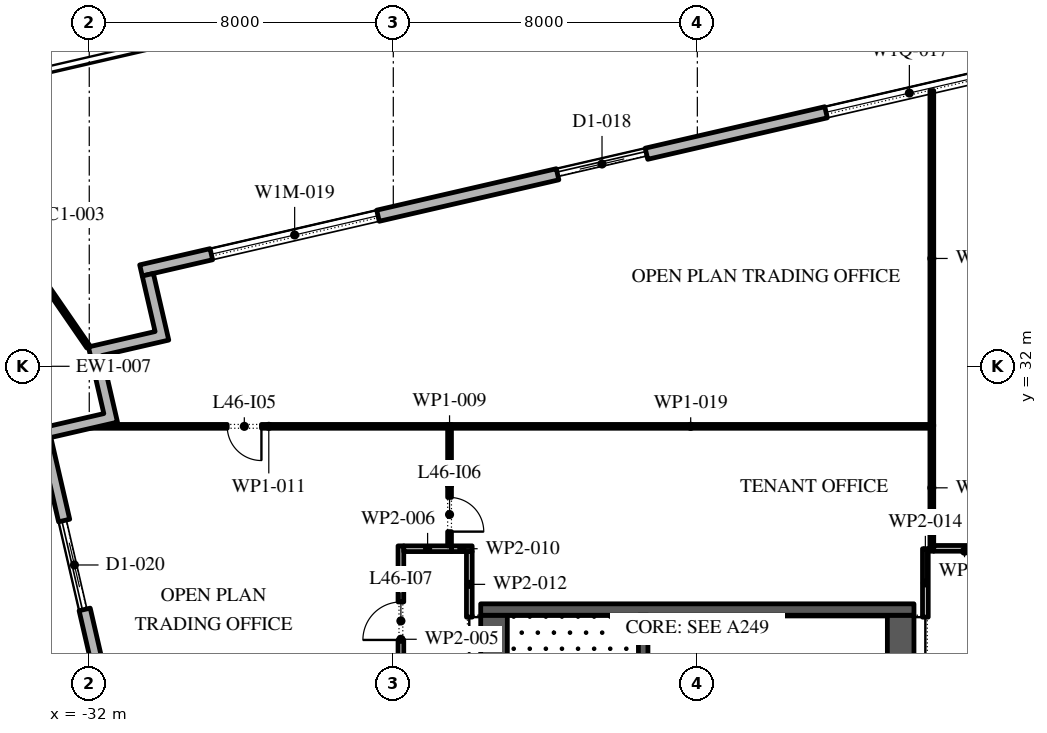
"""IFC4 building model, lengths in metres.
Left out: names, types, materials, properties, quantities, classifications, styles, units other than length and angle.
Written with IfcOpenShell. Run it as: python <this file> out.ifc"""

import sys

from ifc_helpers import new_model, si_unit, direction, frame, frame_2d, origin, place, context, subcontext, project, spatial, polyline, rectangle, outline, extrude, element, fill, save


model = new_model("IFC4")
c1 = context("Model", 3, precision=1e-05, world=origin(), true_north=direction((0.0, 1.0)))
c2 = subcontext(c1, "Body", "Model", "MODEL_VIEW")
j1 = project(units=[si_unit("LENGTHUNIT", "METRE"), si_unit("PLANEANGLEUNIT", "RADIAN")], contexts=[c1])
p1 = place(None, origin())
s1 = spatial("IfcSite", under=j1, at=p1, CompositionType="ELEMENT")
p2 = place(p1, origin())
s2 = spatial("IfcBuilding", under=s1, at=p2, CompositionType="ELEMENT")
p3 = place(p2, frame((0.0, 0.0, 209.4)))
s3 = spatial("IfcBuildingStorey", under=s2, at=p3, CompositionType="ELEMENT", Elevation=209.4)
p4 = place(p3, frame((17.592, 45.657, 0.0), z_axis=(0.0, 0.0, 1.0), x_axis=(-0.974370243697, -0.224950279389, 0.0)))
e1 = element("IfcWall", 1, at=p4, inside=s3, PredefinedType="STANDARD", context=c2, shape_type="SweptSolid", body=[
    extrude(rectangle(XDim=49.5, YDim=0.3, at=frame_2d((24.75, 0.0))), origin(), (0.0, 0.0, 1.0), 4.0),
])
p5 = place(p4, frame((3.6, 0.0, 0.0)))
e2 = element("IfcOpeningElement", 2, at=p5, cuts=e1, PredefinedType="OPENING", context=c2, shape_type="SweptSolid", body=[
    extrude(rectangle(XDim=2.4, YDim=3.5, at=frame_2d((1.2, 1.75))), frame((0.0, 0.16, 0.0), z_axis=(0.0, -1.0, 0.0), x_axis=(1.0, 0.0, 0.0)), (0.0, 0.0, 1.0), 0.32),
])
p6 = place(p4, frame((9.9, 0.0, 0.45)))
e3 = element("IfcOpeningElement", 3, at=p6, cuts=e1, PredefinedType="OPENING", context=c2, shape_type="SweptSolid", body=[
    extrude(rectangle(XDim=4.5, YDim=2.45, at=frame_2d((2.25, 1.225))), frame((0.0, 0.16, 0.0), z_axis=(0.0, -1.0, 0.0), x_axis=(1.0, 0.0, 0.0)), (0.0, 0.0, 1.0), 0.32),
])
p7 = place(p4, frame((18.2, 0.0, 0.45)))
e4 = element("IfcOpeningElement", 4, at=p7, cuts=e1, PredefinedType="OPENING", context=c2, shape_type="SweptSolid", body=[
    extrude(rectangle(XDim=4.5, YDim=2.45, at=frame_2d((2.25, 1.225))), frame((0.0, 0.16, 0.0), z_axis=(0.0, -1.0, 0.0), x_axis=(1.0, 0.0, 0.0)), (0.0, 0.0, 1.0), 0.32),
])
p8 = place(p4, frame((26.5, 0.0, 0.45)))
e5 = element("IfcOpeningElement", 5, at=p8, cuts=e1, PredefinedType="OPENING", context=c2, shape_type="SweptSolid", body=[
    extrude(rectangle(XDim=4.5, YDim=2.45, at=frame_2d((2.25, 1.225))), frame((0.0, 0.16, 0.0), z_axis=(0.0, -1.0, 0.0), x_axis=(1.0, 0.0, 0.0)), (0.0, 0.0, 1.0), 0.32),
])
p9 = place(p4, frame((35.85, 0.0, 0.0)))
e6 = element("IfcOpeningElement", 6, at=p9, cuts=e1, PredefinedType="OPENING", context=c2, shape_type="SweptSolid", body=[
    extrude(rectangle(XDim=2.4, YDim=3.5, at=frame_2d((1.2, 1.75))), frame((0.0, 0.16, 0.0), z_axis=(0.0, -1.0, 0.0), x_axis=(1.0, 0.0, 0.0)), (0.0, 0.0, 1.0), 0.32),
])
p10 = place(p4, frame((43.1, 0.0, 0.45)))
e7 = element("IfcOpeningElement", 7, at=p10, cuts=e1, PredefinedType="OPENING", context=c2, shape_type="SweptSolid", body=[
    extrude(rectangle(XDim=4.5, YDim=2.575, at=frame_2d((2.25, 1.288))), frame((0.0, 0.16, 0.0), z_axis=(0.0, -1.0, 0.0), x_axis=(1.0, 0.0, 0.0)), (0.0, 0.0, 1.0), 0.32),
])
p11 = place(p3, frame((-33.157, 30.092, 0.0), z_axis=(0.0, 0.0, 1.0), x_axis=(0.224950279389, -0.974370243697, 0.0)))
e8 = element("IfcWall", 8, at=p11, inside=s3, PredefinedType="STANDARD", context=c2, shape_type="SweptSolid", body=[
    extrude(rectangle(XDim=49.5, YDim=0.3, at=frame_2d((24.75, 0.0))), origin(), (0.0, 0.0, 1.0), 4.0),
])
p12 = place(p11, frame((2.207, 0.0, 0.0)))
e9 = element("IfcOpeningElement", 9, at=p12, cuts=e8, PredefinedType="OPENING", context=c2, shape_type="SweptSolid", body=[
    extrude(rectangle(XDim=2.4, YDim=3.5, at=frame_2d((1.2, 1.75))), frame((0.0, 0.16, 0.0), z_axis=(0.0, -1.0, 0.0), x_axis=(1.0, 0.0, 0.0)), (0.0, 0.0, 1.0), 0.32),
])
p13 = place(p11, frame((8.121, 0.0, 0.45)))
e10 = element("IfcOpeningElement", 10, at=p13, cuts=e8, PredefinedType="OPENING", context=c2, shape_type="SweptSolid", body=[
    extrude(rectangle(XDim=4.5, YDim=2.825, at=frame_2d((2.25, 1.413))), frame((0.0, 0.16, 0.0), z_axis=(0.0, -1.0, 0.0), x_axis=(1.0, 0.0, 0.0)), (0.0, 0.0, 1.0), 0.32),
])
p14 = place(p11, frame((15.236, 0.0, 0.45)))
e11 = element("IfcOpeningElement", 11, at=p14, cuts=e8, PredefinedType="OPENING", context=c2, shape_type="SweptSolid", body=[
    extrude(rectangle(XDim=4.5, YDim=2.95, at=frame_2d((2.25, 1.475))), frame((0.0, 0.16, 0.0), z_axis=(0.0, -1.0, 0.0), x_axis=(1.0, 0.0, 0.0)), (0.0, 0.0, 1.0), 0.32),
])
p15 = place(p11, frame((22.35, 0.0, 0.45)))
e12 = element("IfcOpeningElement", 12, at=p15, cuts=e8, PredefinedType="OPENING", context=c2, shape_type="SweptSolid", body=[
    extrude(rectangle(XDim=4.5, YDim=3.0, at=frame_2d((2.25, 1.5))), frame((0.0, 0.16, 0.0), z_axis=(0.0, -1.0, 0.0), x_axis=(1.0, 0.0, 0.0)), (0.0, 0.0, 1.0), 0.32),
])
p16 = place(p11, frame((30.514, 0.0, 0.0)))
e13 = element("IfcOpeningElement", 13, at=p16, cuts=e8, PredefinedType="OPENING", context=c2, shape_type="SweptSolid", body=[
    extrude(rectangle(XDim=2.4, YDim=3.5, at=frame_2d((1.2, 1.75))), frame((0.0, 0.16, 0.0), z_axis=(0.0, -1.0, 0.0), x_axis=(1.0, 0.0, 0.0)), (0.0, 0.0, 1.0), 0.32),
])
p17 = place(p11, frame((36.579, 0.0, 0.45)))
e14 = element("IfcOpeningElement", 14, at=p17, cuts=e8, PredefinedType="OPENING", context=c2, shape_type="SweptSolid", body=[
    extrude(rectangle(XDim=4.5, YDim=3.05, at=frame_2d((2.25, 1.525))), frame((0.0, 0.16, 0.0), z_axis=(0.0, -1.0, 0.0), x_axis=(1.0, 0.0, 0.0)), (0.0, 0.0, 1.0), 0.32),
])
p18 = place(p11, frame((43.693, 0.0, 0.45)))
e15 = element("IfcOpeningElement", 15, at=p18, cuts=e8, PredefinedType="OPENING", context=c2, shape_type="SweptSolid", body=[
    extrude(rectangle(XDim=4.5, YDim=3.05, at=frame_2d((2.25, 1.525))), frame((0.0, 0.16, 0.0), z_axis=(0.0, -1.0, 0.0), x_axis=(1.0, 0.0, 0.0)), (0.0, 0.0, 1.0), 0.32),
])
p19 = place(p3, origin())
e16 = element("IfcWall", 16, at=p19, inside=s3, PredefinedType="STANDARD", context=c2, shape_type="SweptSolid", body=[
    extrude(outline(polyline([(-31.617, 30.756), (-32.022, 32.51), (-30.268, 32.914), (-30.605, 34.376), (-30.313, 34.443), (-29.908, 32.69), (-31.662, 32.285), (-31.257, 30.531), (-33.303, 30.058), (-33.371, 30.351), (-31.617, 30.756)])), origin(), (0.0, 0.0, 1.0), 4.0),
])
p20 = place(p3, frame((-32.022, 32.51, -0.05), z_axis=(0.0, 0.0, 1.0), x_axis=(-0.566963777768, 0.823742723609, 0.0)))
e17 = element("IfcWall", 17, at=p20, inside=s3, PredefinedType="STANDARD", context=c2, shape_type="SweptSolid", body=[
    extrude(rectangle(XDim=5.668, YDim=0.1, at=frame_2d((2.834, 0.0))), origin(), (0.0, 0.0, 1.0), 4.05),
])
p21 = place(p3, frame((-21.35, -2.45, 0.0), z_axis=(0.0, 0.0, 1.0), x_axis=(0.0, 1.0, 0.0)))
e18 = element("IfcWall", 18, at=p21, inside=s3, PredefinedType="SHEAR", context=c2, shape_type="SweptSolid", body=[
    extrude(rectangle(XDim=27.9, YDim=0.7, at=frame_2d((13.95, 0.0))), origin(), (0.0, 0.0, 1.0), 4.0),
])
p22 = place(p21, frame((5.05, 0.0, 0.0)))
e19 = element("IfcOpeningElement", 19, at=p22, cuts=e18, PredefinedType="OPENING", context=c2, shape_type="SweptSolid", body=[
    extrude(rectangle(XDim=1.2, YDim=2.1, at=frame_2d((0.6, 1.05))), frame((0.0, 0.36, 0.0), z_axis=(0.0, -1.0, 0.0), x_axis=(1.0, 0.0, 0.0)), (0.0, 0.0, 1.0), 0.72),
])
p23 = place(p21, frame((21.65, 0.0, 0.0)))
e20 = element("IfcOpeningElement", 20, at=p23, cuts=e18, PredefinedType="OPENING", context=c2, shape_type="SweptSolid", body=[
    extrude(rectangle(XDim=1.2, YDim=2.1, at=frame_2d((0.6, 1.05))), frame((0.0, 0.36, 0.0), z_axis=(0.0, -1.0, 0.0), x_axis=(1.0, 0.0, 0.0)), (0.0, 0.0, 1.0), 0.72),
])
p24 = place(p3, frame((-10.65, -2.45, 0.0), z_axis=(0.0, 0.0, 1.0), x_axis=(0.0, 1.0, 0.0)))
e21 = element("IfcWall", 21, at=p24, inside=s3, PredefinedType="SHEAR", context=c2, shape_type="SweptSolid", body=[
    extrude(rectangle(XDim=27.9, YDim=0.7, at=frame_2d((13.95, 0.0))), origin(), (0.0, 0.0, 1.0), 4.0),
])
p25 = place(p24, frame((23.65, 0.0, 0.0)))
e22 = element("IfcOpeningElement", 22, at=p25, cuts=e21, PredefinedType="OPENING", context=c2, shape_type="SweptSolid", body=[
    extrude(rectangle(XDim=2.4, YDim=2.1, at=frame_2d((1.2, 1.05))), frame((0.0, 0.36, 0.0), z_axis=(0.0, -1.0, 0.0), x_axis=(1.0, 0.0, 0.0)), (0.0, 0.0, 1.0), 0.72),
])
p26 = place(p24, frame((0.788, 0.0, 0.0)))
e23 = element("IfcOpeningElement", 23, at=p26, cuts=e21, PredefinedType="OPENING", context=c2, shape_type="SweptSolid", body=[
    extrude(rectangle(XDim=0.9, YDim=2.1, at=frame_2d((0.45, 1.05))), frame((0.0, 0.36, 0.0), z_axis=(0.0, -1.0, 0.0), x_axis=(1.0, 0.0, 0.0)), (0.0, 0.0, 1.0), 0.72),
])
p27 = place(p24, frame((3.962, 0.0, 0.0)))
e24 = element("IfcOpeningElement", 24, at=p27, cuts=e21, PredefinedType="OPENING", context=c2, shape_type="SweptSolid", body=[
    extrude(rectangle(XDim=1.0, YDim=2.1, at=frame_2d((0.5, 1.05))), frame((0.0, 0.36, 0.0), z_axis=(0.0, -1.0, 0.0), x_axis=(1.0, 0.0, 0.0)), (0.0, 0.0, 1.0), 0.72),
])
p28 = place(p3, frame((-21.7, 25.6, 0.0), z_axis=(0.0, 0.0, 1.0), x_axis=(1.0, 0.0, 0.0)))
e25 = element("IfcWall", 25, at=p28, inside=s3, PredefinedType="SHEAR", context=c2, shape_type="SweptSolid", body=[
    extrude(rectangle(XDim=11.4, YDim=0.3, at=frame_2d((5.7, 0.0))), origin(), (0.0, 0.0, 1.0), 4.0),
])
p29 = place(p3, frame((-17.425, 19.15, 0.0), z_axis=(0.0, 0.0, 1.0), x_axis=(0.0, 1.0, 0.0)))
e26 = element("IfcWall", 26, at=p29, inside=s3, PredefinedType="SHEAR", context=c2, shape_type="SweptSolid", body=[
    extrude(rectangle(XDim=6.3, YDim=0.25, at=frame_2d((3.15, 0.0))), origin(), (0.0, 0.0, 1.0), 4.0),
])
p30 = place(p29, frame((0.05, 0.0, 0.0)))
e27 = element("IfcOpeningElement", 27, at=p30, cuts=e26, PredefinedType="OPENING", context=c2, shape_type="SweptSolid", body=[
    extrude(rectangle(XDim=1.2, YDim=2.1, at=frame_2d((0.6, 1.05))), frame((0.0, 0.135, 0.0), z_axis=(0.0, -1.0, 0.0), x_axis=(1.0, 0.0, 0.0)), (0.0, 0.0, 1.0), 0.27),
])
p31 = place(p3, frame((-23.8, 22.36, 0.0), z_axis=(0.0, 0.0, 1.0), x_axis=(0.0, 1.0, 0.0)))
e28 = element("IfcWall", 28, at=p31, inside=s3, PredefinedType="PARTITIONING", context=c2, shape_type="SweptSolid", body=[
    extrude(rectangle(XDim=4.915, YDim=0.15, at=frame_2d((2.458, 0.0))), origin(), (0.0, 0.0, 1.0), 4.0),
])
p32 = place(p31, frame((2.44, 0.0, 0.0)))
e29 = element("IfcOpeningElement", 29, at=p32, cuts=e28, PredefinedType="OPENING", context=c2, shape_type="SweptSolid", body=[
    extrude(rectangle(XDim=1.0, YDim=2.1, at=frame_2d((0.5, 1.05))), frame((0.0, 0.085, 0.0), z_axis=(0.0, -1.0, 0.0), x_axis=(1.0, 0.0, 0.0)), (0.0, 0.0, 1.0), 0.17),
])
p33 = place(p3, frame((-23.725, 27.2, 0.0), z_axis=(0.0, 0.0, 1.0), x_axis=(1.0, 0.0, 0.0)))
e30 = element("IfcWall", 30, at=p33, inside=s3, PredefinedType="PARTITIONING", context=c2, shape_type="SweptSolid", body=[
    extrude(rectangle(XDim=1.255, YDim=0.15, at=frame_2d((0.627, 0.0))), origin(), (0.0, 0.0, 1.0), 4.0),
])
p34 = place(p3, frame((-22.52, 27.275, 0.0), z_axis=(0.0, 0.0, 1.0), x_axis=(0.0, 1.0, 0.0)))
e31 = element("IfcWall", 31, at=p34, inside=s3, PredefinedType="PARTITIONING", context=c2, shape_type="SweptSolid", body=[
    extrude(rectangle(XDim=3.195, YDim=0.1, at=frame_2d((1.598, 0.0))), origin(), (0.0, 0.0, 1.0), 4.0),
])
p35 = place(p34, frame((0.375, 0.0, 0.0)))
e32 = element("IfcOpeningElement", 32, at=p35, cuts=e31, PredefinedType="OPENING", context=c2, shape_type="SweptSolid", body=[
    extrude(rectangle(XDim=0.9, YDim=2.1, at=frame_2d((0.45, 1.05))), frame((0.0, 0.06, 0.0), z_axis=(0.0, -1.0, 0.0), x_axis=(1.0, 0.0, 0.0)), (0.0, 0.0, 1.0), 0.12),
])
p36 = place(p3, frame((-22.47, 27.2, 0.0), z_axis=(0.0, 0.0, 1.0), x_axis=(1.0, 0.0, 0.0)))
e33 = element("IfcWall", 33, at=p36, inside=s3, PredefinedType="PARTITIONING", context=c2, shape_type="SweptSolid", body=[
    extrude(rectangle(XDim=0.545, YDim=0.15, at=frame_2d((0.272, 0.0))), origin(), (0.0, 0.0, 1.0), 4.0),
])
p37 = place(p3, frame((-22.57, 30.42, 0.0), z_axis=(0.0, 0.0, 1.0), x_axis=(-1.0, 0.0, 0.0)))
e34 = element("IfcWall", 34, at=p37, inside=s3, PredefinedType="PARTITIONING", context=c2, shape_type="SweptSolid", body=[
    extrude(rectangle(XDim=9.412, YDim=0.1, at=frame_2d((4.706, 0.0))), origin(), (0.0, 0.0, 1.0), 4.0),
])
p38 = place(p37, frame((4.9, 0.0, 0.0)))
e35 = element("IfcOpeningElement", 35, at=p38, cuts=e34, PredefinedType="OPENING", context=c2, shape_type="SweptSolid", body=[
    extrude(rectangle(XDim=0.9, YDim=2.1, at=frame_2d((0.45, 1.05))), frame((0.0, 0.06, 0.0), z_axis=(0.0, -1.0, 0.0), x_axis=(1.0, 0.0, 0.0)), (0.0, 0.0, 1.0), 0.12),
])
p39 = place(p3, frame((-22.0, 27.125, 0.0), z_axis=(0.0, 0.0, 1.0), x_axis=(0.0, -1.0, 0.0)))
e36 = element("IfcWall", 36, at=p39, inside=s3, PredefinedType="PARTITIONING", context=c2, shape_type="SweptSolid", body=[
    extrude(rectangle(XDim=1.725, YDim=0.15, at=frame_2d((0.863, 0.0))), origin(), (0.0, 0.0, 1.0), 4.0),
])
p40 = place(p3, frame((-10.0, 25.4, 0.0), z_axis=(0.0, 0.0, 1.0), x_axis=(0.0, 1.0, 0.0)))
e37 = element("IfcWall", 37, at=p40, inside=s3, PredefinedType="PARTITIONING", context=c2, shape_type="SweptSolid", body=[
    extrude(rectangle(XDim=1.8, YDim=0.15, at=frame_2d((0.9, 0.0))), origin(), (0.0, 0.0, 1.0), 4.0),
])
p41 = place(p3, frame((-9.83, 27.135, 0.0), z_axis=(0.0, 0.0, 1.0), x_axis=(0.0, 1.0, 0.0)))
e38 = element("IfcWall", 38, at=p41, inside=s3, PredefinedType="PARTITIONING", context=c2, shape_type="SweptSolid", body=[
    extrude(rectangle(XDim=3.335, YDim=0.1, at=frame_2d((1.667, 0.0))), origin(), (0.0, 0.0, 1.0), 4.0),
])
p42 = place(p3, frame((-9.78, 27.21, 0.0), z_axis=(0.0, 0.0, 1.0), x_axis=(1.0, 0.0, 0.0)))
e39 = element("IfcWall", 39, at=p42, inside=s3, PredefinedType="PARTITIONING", context=c2, shape_type="SweptSolid", body=[
    extrude(rectangle(XDim=1.62, YDim=0.15, at=frame_2d((0.81, 0.0))), origin(), (0.0, 0.0, 1.0), 4.0),
])
p43 = place(p3, frame((-9.88, 30.42, 0.0), z_axis=(0.0, 0.0, 1.0), x_axis=(-1.0, 0.0, 0.0)))
e40 = element("IfcWall", 40, at=p43, inside=s3, PredefinedType="PARTITIONING", context=c2, shape_type="SweptSolid", body=[
    extrude(rectangle(XDim=12.59, YDim=0.1, at=frame_2d((6.295, 0.0))), origin(), (0.0, 0.0, 1.0), 4.0),
])
p44 = place(p3, frame((-9.83, 30.42, 0.0), z_axis=(0.0, 0.0, 1.0), x_axis=(0.0, 1.0, 0.0)))
e41 = element("IfcWall", 41, at=p44, inside=s3, PredefinedType="PARTITIONING", context=c2, shape_type="SweptSolid", body=[
    extrude(rectangle(XDim=8.835, YDim=0.1, at=frame_2d((4.417, 0.0))), origin(), (0.0, 0.0, 1.0), 4.0),
])
p45 = place(p8, origin())
e42 = element("IfcWindow", 42, at=p45, inside=s3, PartitioningType="DOUBLE_PANEL_VERTICAL", PredefinedType="WINDOW", context=c2, shape_type="SweptSolid", body=[
    extrude(rectangle(XDim=4.5, YDim=2.45, at=frame_2d((2.25, 1.225))), frame((0.0, 0.03, 0.0), z_axis=(0.0, -1.0, 0.0), x_axis=(1.0, 0.0, 0.0)), (0.0, 0.0, 1.0), 0.06),
])
fill(e5, e42)
p46 = place(p9, origin())
e43 = element("IfcDoor", 43, at=p46, inside=s3, OperationType="DOUBLE_DOOR_SLIDING", PredefinedType="DOOR", context=c2, shape_type="SweptSolid", body=[
    extrude(rectangle(XDim=2.4, YDim=3.5, at=frame_2d((1.2, 1.75))), frame((0.0, 0.025, 0.0), z_axis=(0.0, -1.0, 0.0), x_axis=(1.0, 0.0, 0.0)), (0.0, 0.0, 1.0), 0.05),
])
fill(e6, e43)
p47 = place(p10, origin())
e44 = element("IfcWindow", 44, at=p47, inside=s3, PartitioningType="DOUBLE_PANEL_VERTICAL", PredefinedType="WINDOW", context=c2, shape_type="SweptSolid", body=[
    extrude(rectangle(XDim=4.5, YDim=2.575, at=frame_2d((2.25, 1.288))), frame((0.0, 0.03, 0.0), z_axis=(0.0, -1.0, 0.0), x_axis=(1.0, 0.0, 0.0)), (0.0, 0.0, 1.0), 0.06),
])
fill(e7, e44)
p48 = place(p12, origin())
e45 = element("IfcDoor", 45, at=p48, inside=s3, OperationType="DOUBLE_DOOR_SLIDING", PredefinedType="DOOR", context=c2, shape_type="SweptSolid", body=[
    extrude(rectangle(XDim=2.4, YDim=3.5, at=frame_2d((1.2, 1.75))), frame((0.0, 0.025, 0.0), z_axis=(0.0, -1.0, 0.0), x_axis=(1.0, 0.0, 0.0)), (0.0, 0.0, 1.0), 0.05),
])
fill(e9, e45)
p49 = place(p38, origin())
e46 = element("IfcDoor", 46, at=p49, inside=s3, OperationType="SINGLE_SWING_RIGHT", PredefinedType="DOOR", context=c2, shape_type="SweptSolid", body=[
    extrude(rectangle(XDim=0.9, YDim=2.1, at=frame_2d((0.45, 1.05))), frame((0.0, 0.025, 0.0), z_axis=(0.0, -1.0, 0.0), x_axis=(1.0, 0.0, 0.0)), (0.0, 0.0, 1.0), 0.05),
])
fill(e35, e46)
p50 = place(p35, frame((0.9, 0.0, 0.0), z_axis=(0.0, 0.0, 1.0), x_axis=(-1.0, 0.0, 0.0)))
e47 = element("IfcDoor", 47, at=p50, inside=s3, OperationType="SINGLE_SWING_LEFT", PredefinedType="DOOR", context=c2, shape_type="SweptSolid", body=[
    extrude(rectangle(XDim=0.9, YDim=2.1, at=frame_2d((0.45, 1.05))), frame((0.0, 0.025, 0.0), z_axis=(0.0, -1.0, 0.0), x_axis=(1.0, 0.0, 0.0)), (0.0, 0.0, 1.0), 0.05),
])
fill(e32, e47)
p51 = place(p32, origin())
e48 = element("IfcDoor", 48, at=p51, inside=s3, OperationType="SINGLE_SWING_RIGHT", PredefinedType="DOOR", context=c2, shape_type="SweptSolid", body=[
    extrude(rectangle(XDim=1.0, YDim=2.1, at=frame_2d((0.5, 1.05))), frame((0.0, 0.025, 0.0), z_axis=(0.0, -1.0, 0.0), x_axis=(1.0, 0.0, 0.0)), (0.0, 0.0, 1.0), 0.05),
])
fill(e29, e48)
save(model, sys.argv[1])
